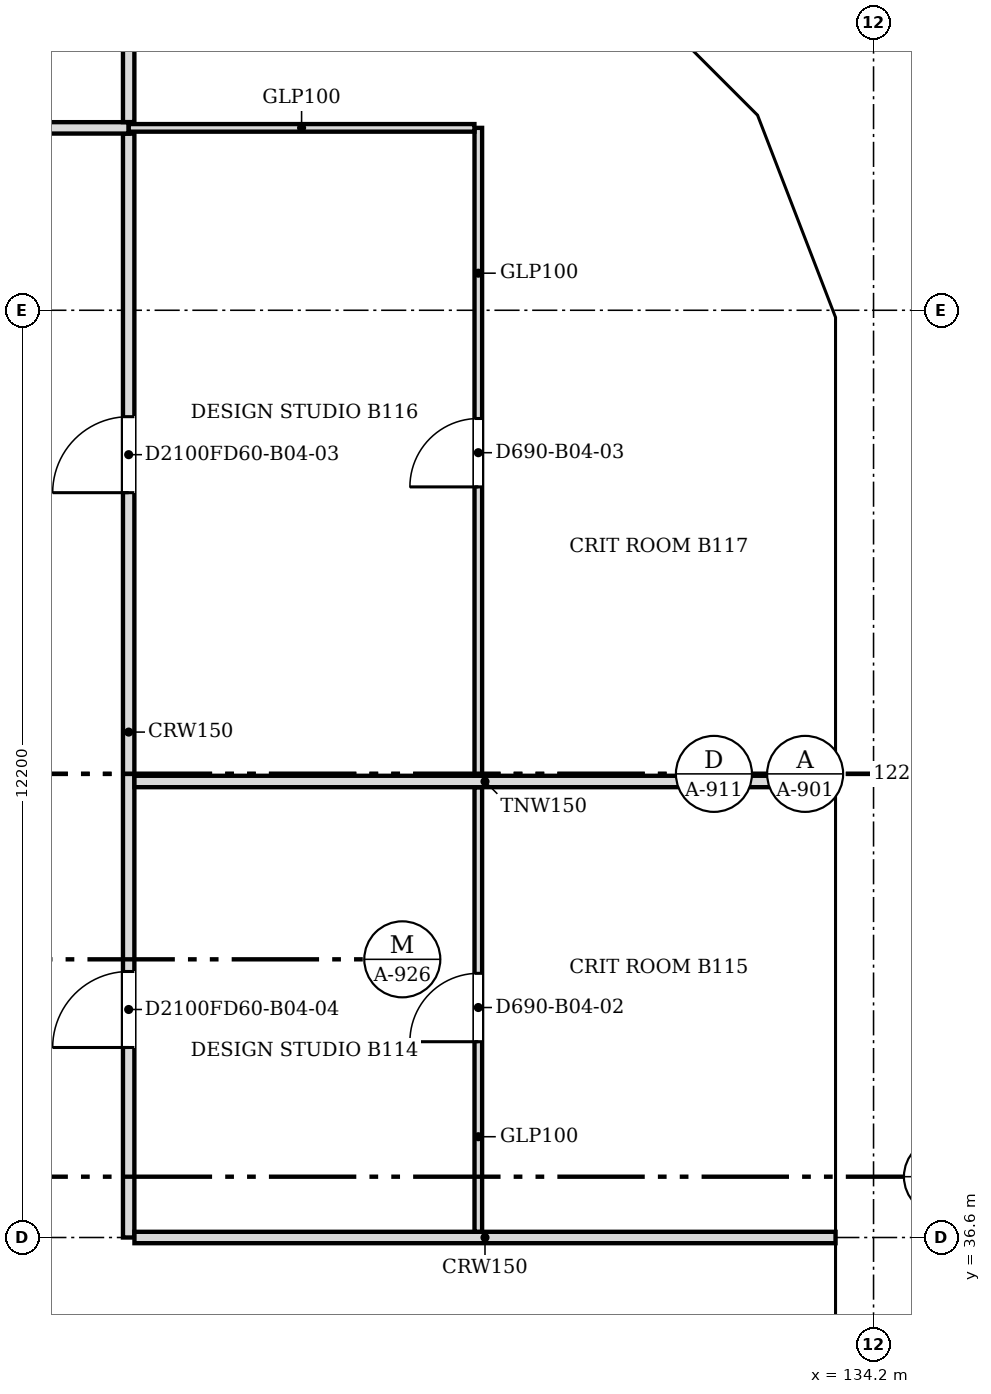
"""IFC4 building model, lengths in metres.
Left out: names, types, materials, properties, quantities, classifications, styles, units other than length and angle.
Written with IfcOpenShell. Run it as: python <this file> out.ifc"""

import sys

from ifc_helpers import new_model, si_unit, direction, frame, frame_2d, origin, place, context, subcontext, project, spatial, polyline, rectangle, outline, extrude, faceted_brep, source, transform, mapped, element, fill, save


model = new_model("IFC4")
c1 = context("Model", 3, precision=1e-05, world=origin(), true_north=direction((0.0, 1.0)))
c2 = subcontext(c1, "Body", "Model", "MODEL_VIEW")
j1 = project(units=[si_unit("LENGTHUNIT", "METRE"), si_unit("PLANEANGLEUNIT", "RADIAN")], contexts=[c1])
p1 = place(None, origin())
s1 = spatial("IfcSite", under=j1, at=p1, CompositionType="ELEMENT")
p2 = place(p1, origin())
s2 = spatial("IfcBuilding", under=s1, at=p2, CompositionType="ELEMENT")
p3 = place(p2, frame((0.0, 0.0, 41.0)))
s3 = spatial("IfcBuildingStorey", under=s2, at=p3, CompositionType="ELEMENT", Elevation=41.0)
m1 = source(origin(), c2, "Body", "SweptSolid", [
    extrude(outline(polyline([(3.05, 0.0), (6.1, 3.8), (3.05, 7.6), (0.0, 3.8), (3.05, 0.0)])), frame((0.0, 0.25, 0.0), z_axis=(0.0, -1.0, 0.0), x_axis=(1.0, 0.0, 0.0)), (0.0, 0.0, 1.0), 0.5),
])
p4 = place(p3, frame((133.95, 30.5, -3.8), z_axis=(0.0, 0.0, 1.0), x_axis=(0.0, 1.0, 0.0)))
e1 = element("IfcWall", 1, at=p4, inside=s3, PredefinedType="SOLIDWALL", context=c2, shape_type="MappedRepresentation", body=[
    mapped(m1, transform((0.0, 0.0, 0.0), scale=1.0)),
])
m2 = source(origin(), c2, "Body", "SweptSolid", [
    extrude(outline(polyline([(3.05, 0.399), (5.78, 3.8), (3.05, 7.201), (0.321, 3.8), (3.05, 0.399)])), frame((0.0, 0.26, 0.0), z_axis=(0.0, -1.0, 0.0), x_axis=(1.0, 0.0, 0.0)), (0.0, 0.0, 1.0), 0.52),
])
p5 = place(p4, origin())
e2 = element("IfcOpeningElement", 2, at=p5, cuts=e1, PredefinedType="OPENING", context=c2, shape_type="MappedRepresentation", body=[
    mapped(m2, transform((0.0, 0.0, 0.0), scale=1.0)),
])
m3 = source(origin(), c2, "Body", "Brep", [
    faceted_brep([(3.05, -0.25, 0.0), (6.1, -0.25, 3.8), (6.1, -0.25, 3.8), (3.05, -0.25, 7.6), (0.0, -0.25, 3.8), (0.0, 0.25, 3.8), (3.05, 0.25, 7.6), (6.1, 0.25, 3.8), (6.1, 0.25, 3.8), (3.05, 0.25, 0.0)], [[[0, 1, 2, 3, 4]], [[5, 6, 7, 8, 9]], [[9, 8, 1, 0]], [[7, 6, 3, 2]], [[6, 5, 4, 3]], [[5, 9, 0, 4]], [[1, 8, 7, 2]]]),
])
p6 = place(p3, frame((133.95, 36.6, -3.8), z_axis=(0.0, 0.0, 1.0), x_axis=(0.0, 1.0, 0.0)))
e3 = element("IfcWall", 3, at=p6, inside=s3, PredefinedType="SOLIDWALL", context=c2, shape_type="MappedRepresentation", body=[
    mapped(m3, transform((0.0, 0.0, 0.0), scale=1.0)),
])
p7 = place(p6, origin())
e4 = element("IfcOpeningElement", 4, at=p7, cuts=e3, PredefinedType="OPENING", context=c2, shape_type="MappedRepresentation", body=[
    mapped(m2, transform((0.0, 0.0, 0.0), scale=1.0)),
])
m4 = source(origin(), c2, "Body", "Brep", [
    faceted_brep([(3.05, -0.25, 0.0), (6.053, -0.25, 3.8), (3.05, -0.25, 7.6), (0.0, -0.25, 3.8), (0.0, 0.25, 3.8), (3.05, 0.25, 7.6), (6.007, 0.25, 3.859), (6.007, 0.25, 3.741), (3.05, 0.25, 0.0), (6.053, 0.0, 3.8)], [[[0, 1, 2, 3]], [[4, 5, 6, 7, 8]], [[8, 7, 9, 1, 0]], [[6, 5, 2, 1, 9]], [[5, 4, 3, 2]], [[4, 8, 0, 3]], [[9, 7, 6]]]),
])
p8 = place(p3, frame((133.95, 42.7, -3.8), z_axis=(0.0, 0.0, 1.0), x_axis=(0.0, 1.0, 0.0)))
e5 = element("IfcWall", 5, at=p8, inside=s3, PredefinedType="SOLIDWALL", context=c2, shape_type="MappedRepresentation", body=[
    mapped(m4, transform((0.0, 0.0, 0.0), scale=1.0)),
])
m5 = source(origin(), c2, "Body", "SweptSolid", [
    extrude(outline(polyline([(3.049, 0.401), (5.735, 3.8), (3.049, 7.199), (0.321, 3.8), (3.049, 0.401)])), frame((0.0, 0.26, 0.0), z_axis=(0.0, -1.0, 0.0), x_axis=(1.0, 0.0, 0.0)), (0.0, 0.0, 1.0), 0.52),
])
p9 = place(p8, origin())
e6 = element("IfcOpeningElement", 6, at=p9, cuts=e5, PredefinedType="OPENING", context=c2, shape_type="MappedRepresentation", body=[
    mapped(m5, transform((0.0, 0.0, 0.0), scale=1.0)),
])
m6 = source(origin(), c2, "Body", "Brep", [
    faceted_brep([(2.95, -0.25, 0.0), (3.003, -0.25, 0.068), (3.003, -0.25, 7.532), (2.95, -0.25, 7.6), (0.0, -0.25, 3.8), (0.047, 0.25, 3.86), (2.898, 0.25, 7.532), (2.898, 0.25, 0.068), (0.047, 0.25, 3.74), (2.95, 0.0, 0.0), (2.95, 0.0, 7.6), (0.0, 0.0, 3.8)], [[[0, 1, 2, 3, 4]], [[5, 6, 7, 8]], [[1, 0, 9]], [[10, 3, 2]], [[6, 5, 11, 4, 3, 10]], [[8, 7, 9, 0, 4, 11]], [[8, 11, 5]], [[1, 9, 7, 6, 10, 2]]]),
])
p10 = place(p3, frame((133.95, 48.753, -3.8), z_axis=(0.0, 0.0, 1.0), x_axis=(-0.359855894603, 0.933007896601, 0.0)))
e7 = element("IfcWall", 7, at=p10, inside=s3, PredefinedType="SOLIDWALL", context=c2, shape_type="MappedRepresentation", body=[
    mapped(m6, transform((0.0, 0.0, 0.0), scale=1.0)),
])
m7 = source(origin(), c2, "Body", "SweptSolid", [
    extrude(outline(polyline([(2.75, 6.935), (0.316, 3.8), (2.75, 0.665), (2.75, 6.935)])), frame((0.0, 0.26, 0.0), z_axis=(0.0, -1.0, 0.0), x_axis=(1.0, 0.0, 0.0)), (0.0, 0.0, 1.0), 0.52),
])
p11 = place(p10, origin())
e8 = element("IfcOpeningElement", 8, at=p11, cuts=e7, PredefinedType="OPENING", context=c2, shape_type="MappedRepresentation", body=[
    mapped(m7, transform((0.0, 0.0, 0.0), scale=1.0)),
])
m8 = source(origin(), c2, "Body", "Brep", [
    faceted_brep([(0.053, -0.25, 0.0), (2.997, -0.25, 3.8), (0.053, -0.25, 7.6), (0.0, -0.25, 7.532), (0.0, -0.25, 0.068), (0.106, 0.25, 7.532), (2.944, 0.25, 3.868), (2.944, 0.25, 3.732), (0.106, 0.25, 0.068), (2.997, 0.0, 3.8), (0.053, 0.0, 0.0), (0.053, 0.0, 7.6)], [[[0, 1, 2, 3, 4]], [[5, 6, 7, 8]], [[8, 7, 9, 1, 0, 10]], [[6, 5, 11, 2, 1, 9]], [[3, 2, 11]], [[10, 0, 4]], [[8, 10, 4, 3, 11, 5]], [[9, 7, 6]]]),
])
p12 = place(p3, frame((132.926, 51.469, -3.8), z_axis=(0.0, 0.0, 1.0), x_axis=(-0.707066050402, 0.707147509625, 0.0)))
e9 = element("IfcWall", 9, at=p12, inside=s3, PredefinedType="SOLIDWALL", context=c2, shape_type="MappedRepresentation", body=[
    mapped(m8, transform((0.0, 0.0, 0.0), scale=1.0)),
])
m9 = source(origin(), c2, "Body", "SweptSolid", [
    extrude(outline(polyline([(0.253, 0.666), (2.681, 3.8), (0.253, 6.934), (0.253, 0.666)])), frame((0.0, 0.26, 0.0), z_axis=(0.0, -1.0, 0.0), x_axis=(1.0, 0.0, 0.0)), (0.0, 0.0, 1.0), 0.52),
])
p13 = place(p12, origin())
e10 = element("IfcOpeningElement", 10, at=p13, cuts=e9, PredefinedType="OPENING", context=c2, shape_type="MappedRepresentation", body=[
    mapped(m9, transform((0.0, 0.0, 0.0), scale=1.0)),
])
p14 = place(p2, frame((0.0, 0.0, 44.8)))
s4 = spatial("IfcBuildingStorey", under=s2, at=p14, CompositionType="ELEMENT", Elevation=44.8)
p15 = place(p14, frame((133.95, 33.55, -3.8), z_axis=(0.0, 0.0, 1.0), x_axis=(0.0, 1.0, 0.0)))
e11 = element("IfcWall", 11, at=p15, inside=s4, PredefinedType="SOLIDWALL", context=c2, shape_type="MappedRepresentation", body=[
    mapped(m3, transform((0.0, 0.0, 0.0), scale=1.0)),
])
p16 = place(p15, origin())
e12 = element("IfcOpeningElement", 12, at=p16, cuts=e11, PredefinedType="OPENING", context=c2, shape_type="MappedRepresentation", body=[
    mapped(m2, transform((0.0, 0.0, 0.0), scale=1.0)),
])
p17 = place(p14, frame((133.95, 39.65, -3.8), z_axis=(0.0, 0.0, 1.0), x_axis=(0.0, 1.0, 0.0)))
e13 = element("IfcWall", 13, at=p17, inside=s4, PredefinedType="SOLIDWALL", context=c2, shape_type="MappedRepresentation", body=[
    mapped(m1, transform((0.0, 0.0, 0.0), scale=1.0)),
])
p18 = place(p17, origin())
e14 = element("IfcOpeningElement", 14, at=p18, cuts=e13, PredefinedType="OPENING", context=c2, shape_type="MappedRepresentation", body=[
    mapped(m2, transform((0.0, 0.0, 0.0), scale=1.0)),
])
m10 = source(origin(), c2, "Body", "Brep", [
    faceted_brep([(3.003, -0.25, 0.0), (3.05, -0.25, 0.06), (3.05, -0.25, 7.54), (3.003, -0.25, 7.6), (0.0, -0.25, 3.8), (0.0, 0.25, 3.8), (2.957, 0.25, 7.541), (2.957, 0.25, 0.059), (3.003, 0.0, 0.0), (3.003, 0.0, 7.6)], [[[0, 1, 2, 3, 4]], [[5, 6, 7]], [[1, 0, 8]], [[9, 3, 2]], [[6, 5, 4, 3, 9]], [[5, 7, 8, 0, 4]], [[1, 8, 7, 6, 9, 2]]]),
])
p19 = place(p14, frame((133.95, 45.75, -3.8), z_axis=(0.0, 0.0, 1.0), x_axis=(0.0, 1.0, 0.0)))
e15 = element("IfcWall", 15, at=p19, inside=s4, PredefinedType="SOLIDWALL", context=c2, shape_type="MappedRepresentation", body=[
    mapped(m10, transform((0.0, 0.0, 0.0), scale=1.0)),
])
m11 = source(origin(), c2, "Body", "SweptSolid", [
    extrude(outline(polyline([(2.803, 6.944), (0.319, 3.8), (2.803, 0.656), (2.803, 6.944)])), frame((0.0, 0.26, 0.0), z_axis=(0.0, -1.0, 0.0), x_axis=(1.0, 0.0, 0.0)), (0.0, 0.0, 1.0), 0.52),
])
p20 = place(p19, origin())
e16 = element("IfcOpeningElement", 16, at=p20, cuts=e15, PredefinedType="OPENING", context=c2, shape_type="MappedRepresentation", body=[
    mapped(m11, transform((0.0, 0.0, 0.0), scale=1.0)),
])
m12 = source(origin(), c2, "Body", "Brep", [
    faceted_brep([(0.047, -0.25, 0.0), (2.997, -0.25, 3.8), (0.047, -0.25, 7.6), (0.0, -0.25, 7.541), (0.0, -0.25, 0.059), (0.093, 0.25, 7.54), (2.944, 0.25, 3.868), (2.944, 0.25, 3.732), (0.093, 0.25, 0.06), (2.997, 0.0, 3.8), (0.047, 0.0, 0.0), (0.047, 0.0, 7.6)], [[[0, 1, 2, 3, 4]], [[5, 6, 7, 8]], [[8, 7, 9, 1, 0, 10]], [[6, 5, 11, 2, 1, 9]], [[3, 2, 11]], [[10, 0, 4]], [[8, 10, 4, 3, 11, 5]], [[9, 7, 6]]]),
])
p21 = place(p14, frame((133.967, 48.71, -3.8), z_axis=(0.0, 0.0, 1.0), x_axis=(-0.359901446078, 0.932990326376, 0.0)))
e17 = element("IfcWall", 17, at=p21, inside=s4, PredefinedType="SOLIDWALL", context=c2, shape_type="MappedRepresentation", body=[
    mapped(m12, transform((0.0, 0.0, 0.0), scale=1.0)),
])
m13 = source(origin(), c2, "Body", "SweptSolid", [
    extrude(outline(polyline([(0.247, 0.665), (2.681, 3.8), (0.247, 6.935), (0.247, 0.665)])), frame((0.0, 0.26, 0.0), z_axis=(0.0, -1.0, 0.0), x_axis=(1.0, 0.0, 0.0)), (0.0, 0.0, 1.0), 0.52),
])
p22 = place(p21, origin())
e18 = element("IfcOpeningElement", 18, at=p22, cuts=e17, PredefinedType="OPENING", context=c2, shape_type="MappedRepresentation", body=[
    mapped(m13, transform((0.0, 0.0, 0.0), scale=1.0)),
])
m14 = source(origin(), c2, "Body", "Brep", [
    faceted_brep([(2.944, -0.25, 0.0), (2.997, -0.25, 0.068), (2.997, -0.25, 7.532), (2.944, -0.25, 7.6), (0.0, -0.25, 3.8), (0.053, 0.25, 3.868), (2.891, 0.25, 7.532), (2.891, 0.25, 0.068), (0.053, 0.25, 3.732), (2.944, 0.0, 0.0), (2.944, 0.0, 7.6), (0.0, 0.0, 3.8)], [[[0, 1, 2, 3, 4]], [[5, 6, 7, 8]], [[1, 0, 9]], [[10, 3, 2]], [[6, 5, 11, 4, 3, 10]], [[8, 7, 9, 0, 4, 11]], [[8, 11, 5]], [[1, 9, 7, 6, 10, 2]]]),
])
p23 = place(p14, frame((132.888, 51.506, -3.8), z_axis=(0.0, 0.0, 1.0), x_axis=(-0.707147509625, 0.707066050402, 0.0)))
e19 = element("IfcWall", 19, at=p23, inside=s4, PredefinedType="SOLIDWALL", context=c2, shape_type="MappedRepresentation", body=[
    mapped(m14, transform((0.0, 0.0, 0.0), scale=1.0)),
])
m15 = source(origin(), c2, "Body", "SweptSolid", [
    extrude(outline(polyline([(2.744, 6.934), (0.316, 3.8), (2.744, 0.666), (2.744, 6.934)])), frame((0.0, 0.26, 0.0), z_axis=(0.0, -1.0, 0.0), x_axis=(1.0, 0.0, 0.0)), (0.0, 0.0, 1.0), 0.52),
])
p24 = place(p23, origin())
e20 = element("IfcOpeningElement", 20, at=p24, cuts=e19, PredefinedType="OPENING", context=c2, shape_type="MappedRepresentation", body=[
    mapped(m15, transform((0.0, 0.0, 0.0), scale=1.0)),
])
p25 = place(p3, frame((124.4, 51.124, 0.0), z_axis=(0.0, 0.0, 1.0), x_axis=(0.0, -1.0, 0.0)))
e21 = element("IfcWall", 21, at=p25, inside=s3, PredefinedType="PARTITIONING", context=c2, shape_type="SweptSolid", body=[
    extrude(rectangle(XDim=14.524, YDim=0.15, at=frame_2d((7.262, 0.0))), origin(), (0.0, 0.0, 1.0), 3.067),
])
m16 = source(origin(), c2, "Body", "SweptSolid", [
    extrude(rectangle(XDim=1.0, YDim=2.1, at=frame_2d((0.5, 1.05))), frame((0.0, 0.085, 0.0), z_axis=(0.0, -1.0, 0.0), x_axis=(1.0, 0.0, 0.0)), (0.0, 0.0, 1.0), 0.17),
])
p26 = place(p25, frame((3.724, 0.0, 0.0)))
e22 = element("IfcOpeningElement", 22, at=p26, cuts=e21, PredefinedType="OPENING", context=c2, shape_type="MappedRepresentation", body=[
    mapped(m16, transform((0.0, 0.0, 0.0), scale=1.0)),
])
p27 = place(p25, frame((11.024, 0.0, 0.0)))
e23 = element("IfcOpeningElement", 23, at=p27, cuts=e21, PredefinedType="OPENING", context=c2, shape_type="MappedRepresentation", body=[
    mapped(m16, transform((0.0, 0.0, 0.0), scale=1.0)),
])
p28 = place(p3, frame((124.476, 36.6, 0.0), z_axis=(0.0, 0.0, 1.0), x_axis=(1.0, 0.0, 0.0)))
e24 = element("IfcWall", 24, at=p28, inside=s3, PredefinedType="PARTITIONING", context=c2, shape_type="SweptSolid", body=[
    extrude(rectangle(XDim=9.224, YDim=0.15, at=frame_2d((4.612, 0.0))), origin(), (0.0, 0.0, 1.0), 3.067),
])
p29 = place(p3, frame((129.0, 42.524, 0.0), z_axis=(0.0, 0.0, 1.0), x_axis=(0.0, -1.0, 0.0)))
e25 = element("IfcWall", 25, at=p29, inside=s3, PredefinedType="PARTITIONING", context=c2, shape_type="SweptSolid", body=[
    extrude(rectangle(XDim=5.848, YDim=0.1, at=frame_2d((2.924, 0.0))), origin(), (0.0, 0.0, 1.0), 3.067),
])
m17 = source(origin(), c2, "Body", "SweptSolid", [
    extrude(rectangle(XDim=0.9, YDim=2.1, at=frame_2d((0.45, 1.05))), frame((0.0, 0.06, 0.0), z_axis=(0.0, -1.0, 0.0), x_axis=(1.0, 0.0, 0.0)), (0.0, 0.0, 1.0), 0.12),
])
p30 = place(p29, frame((2.448, 0.0, 0.0)))
e26 = element("IfcOpeningElement", 26, at=p30, cuts=e25, PredefinedType="OPENING", context=c2, shape_type="MappedRepresentation", body=[
    mapped(m17, transform((0.0, 0.0, 0.0), scale=1.0)),
])
p31 = place(p3, frame((124.476, 42.6, 0.0), z_axis=(0.0, 0.0, 1.0), x_axis=(1.0, 0.0, 0.0)))
e27 = element("IfcWall", 27, at=p31, inside=s3, PredefinedType="PARTITIONING", context=c2, shape_type="SweptSolid", body=[
    extrude(rectangle(XDim=9.224, YDim=0.15, at=frame_2d((4.612, 0.0))), origin(), (0.0, 0.0, 1.0), 3.067),
])
p32 = place(p3, frame((129.0, 51.2, 0.0), z_axis=(0.0, 0.0, 1.0), x_axis=(0.0, -1.0, 0.0)))
e28 = element("IfcWall", 28, at=p32, inside=s3, PredefinedType="PARTITIONING", context=c2, shape_type="SweptSolid", body=[
    extrude(rectangle(XDim=8.524, YDim=0.1, at=frame_2d((4.262, 0.0))), origin(), (0.0, 0.0, 1.0), 3.067),
])
p33 = place(p32, frame((3.824, 0.0, 0.0)))
e29 = element("IfcOpeningElement", 29, at=p33, cuts=e28, PredefinedType="OPENING", context=c2, shape_type="MappedRepresentation", body=[
    mapped(m17, transform((0.0, 0.0, 0.0), scale=1.0)),
])
p34 = place(p3, frame((108.5, 51.2, 0.0), z_axis=(0.0, 0.0, 1.0), x_axis=(1.0, 0.0, 0.0)))
e30 = element("IfcWall", 30, at=p34, inside=s3, PredefinedType="PARTITIONING", context=c2, shape_type="SweptSolid", body=[
    extrude(rectangle(XDim=15.9, YDim=0.15, at=frame_2d((7.95, 0.0))), origin(), (0.0, 0.0, 1.0), 3.067),
])
m18 = source(origin(), c2, "Body", "SweptSolid", [
    extrude(rectangle(XDim=0.9, YDim=2.1, at=frame_2d((0.45, 1.05))), frame((0.0, 0.085, 0.0), z_axis=(0.0, -1.0, 0.0), x_axis=(1.0, 0.0, 0.0)), (0.0, 0.0, 1.0), 0.17),
])
p35 = place(p34, frame((7.5, 0.0, 0.0)))
e31 = element("IfcOpeningElement", 31, at=p35, cuts=e30, PredefinedType="OPENING", context=c2, shape_type="MappedRepresentation", body=[
    mapped(m18, transform((0.0, 0.0, 0.0), scale=1.0)),
])
p36 = place(p3, frame((124.401, 51.2, 0.0), z_axis=(0.0, 0.0, 1.0), x_axis=(1.0, 0.0, 0.0)))
e32 = element("IfcWall", 32, at=p36, inside=s3, PredefinedType="PARTITIONING", context=c2, shape_type="SweptSolid", body=[
    extrude(rectangle(XDim=4.548, YDim=0.1, at=frame_2d((2.274, 0.0))), origin(), (0.0, 0.0, 1.0), 3.067),
])
p37 = place(p3, frame((124.4, 51.276, 0.0), z_axis=(0.0, 0.0, 1.0), x_axis=(0.0, 1.0, 0.0)))
e33 = element("IfcWall", 33, at=p37, inside=s3, PredefinedType="PARTITIONING", context=c2, shape_type="SweptSolid", body=[
    extrude(rectangle(XDim=3.124, YDim=0.15, at=frame_2d((1.562, 0.0))), origin(), (0.0, 0.0, 1.0), 3.067),
])
m19 = source(origin(), c2, "Body", "SweptSolid", [
    extrude(rectangle(XDim=0.9, YDim=2.1, at=frame_2d((0.45, 1.05))), frame((0.0, 0.025, 0.0), z_axis=(0.0, -1.0, 0.0), x_axis=(1.0, 0.0, 0.0)), (0.0, 0.0, 1.0), 0.05),
])
p38 = place(p30, origin())
e34 = element("IfcDoor", 34, at=p38, inside=s3, OperationType="SINGLE_SWING_RIGHT", PredefinedType="DOOR", context=c2, shape_type="MappedRepresentation", body=[
    mapped(m19, transform((0.0, 0.0, 0.0), scale=1.0)),
])
fill(e26, e34)
m20 = source(origin(), c2, "Body", "SweptSolid", [
    extrude(rectangle(XDim=1.0, YDim=2.1, at=frame_2d((0.5, 1.05))), frame((0.0, 0.025, 0.0), z_axis=(0.0, -1.0, 0.0), x_axis=(1.0, 0.0, 0.0)), (0.0, 0.0, 1.0), 0.05),
])
p39 = place(p26, origin())
e35 = element("IfcDoor", 35, at=p39, inside=s3, OperationType="SINGLE_SWING_RIGHT", PredefinedType="DOOR", context=c2, shape_type="MappedRepresentation", body=[
    mapped(m20, transform((0.0, 0.0, 0.0), scale=1.0)),
])
fill(e22, e35)
p40 = place(p27, origin())
e36 = element("IfcDoor", 36, at=p40, inside=s3, OperationType="SINGLE_SWING_RIGHT", PredefinedType="DOOR", context=c2, shape_type="MappedRepresentation", body=[
    mapped(m20, transform((0.0, 0.0, 0.0), scale=1.0)),
])
fill(e23, e36)
p41 = place(p33, origin())
e37 = element("IfcDoor", 37, at=p41, inside=s3, OperationType="SINGLE_SWING_RIGHT", PredefinedType="DOOR", context=c2, shape_type="MappedRepresentation", body=[
    mapped(m19, transform((0.0, 0.0, 0.0), scale=1.0)),
])
fill(e29, e37)
save(model, sys.argv[1])
